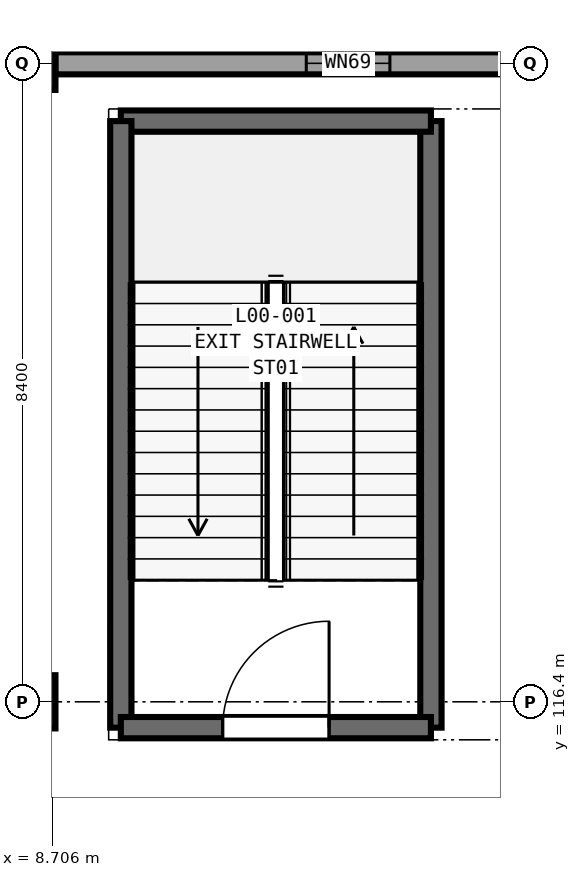
"""IFC4 building model, lengths in metres.
Left out: names, types, materials, properties, quantities, classifications, styles, units other than length and angle.
Written with IfcOpenShell. Run it as: python <this file> out.ifc"""

import sys

from ifc_helpers import new_model, si_unit, direction, frame, frame_2d, origin, origin_2d, place, context, subcontext, project, spatial, rectangle, extrude, element, fill, save


model = new_model("IFC4")
c1 = context("Model", 3, precision=1e-05, world=origin(), true_north=direction((0.0, 1.0)))
c2 = subcontext(c1, "Body", "Model", "MODEL_VIEW")
j1 = project(units=[si_unit("LENGTHUNIT", "METRE"), si_unit("PLANEANGLEUNIT", "RADIAN")], contexts=[c1])
p1 = place(None, origin())
s1 = spatial("IfcSite", under=j1, at=p1, CompositionType="ELEMENT")
p2 = place(p1, origin())
s2 = spatial("IfcBuilding", under=s1, at=p2, CompositionType="ELEMENT")
p3 = place(p2, origin())
s3 = spatial("IfcBuildingStorey", under=s2, at=p3, CompositionType="ELEMENT", Elevation=0.0)
for number, where, z_axis, x_axis in (
    (1, (8.4, 116.4, 0.0), (0.0, 0.0, 1.0), (1.0, 0.0, 0.0)),
    (2, (8.4, 124.8, 0.0), (0.0, 0.0, 1.0), (1.0, 0.0, 0.0)),
):
    element("IfcColumn", number, at=place(p3, frame(where, z_axis=z_axis, x_axis=x_axis)), inside=s3, PredefinedType="COLUMN", context=c2, shape_type="SweptSolid", body=[
        extrude(rectangle(XDim=0.7, YDim=0.7, at=origin_2d()), origin(), (0.0, 0.0, 1.0), 5.4),
    ])
p4 = place(p3, frame((8.748, 124.8, 0.0), z_axis=(0.0, 0.0, 1.0), x_axis=(1.0, 0.0, 0.0)))
e3 = element("IfcWall", 3, at=p4, inside=s3, PredefinedType="SOLIDWALL", context=c2, shape_type="SweptSolid", body=[
    extrude(rectangle(XDim=7.704, YDim=0.29, at=frame_2d((3.852, 0.0))), origin(), (0.0, 0.0, 1.0), 4.68),
])
p5 = place(p4, frame((3.302, 0.0, 0.9)))
e4 = element("IfcOpeningElement", 4, at=p5, cuts=e3, PredefinedType="OPENING", context=c2, shape_type="SweptSolid", body=[
    extrude(rectangle(XDim=1.1, YDim=1.55, at=frame_2d((0.55, 0.775))), frame((0.0, 0.155, 0.0), z_axis=(0.0, -1.0, 0.0), x_axis=(1.0, 0.0, 0.0)), (0.0, 0.0, 1.0), 0.31),
])
p6 = place(p3, frame((13.69, 116.06, 0.0), z_axis=(0.0, 0.0, 1.0), x_axis=(0.0, 1.0, 0.0)))
e5 = element("IfcWall", 5, at=p6, inside=s3, PredefinedType="SHEAR", context=c2, shape_type="SweptSolid", body=[
    extrude(rectangle(XDim=7.98, YDim=0.28, at=frame_2d((3.99, 0.0))), origin(), (0.0, 0.0, 1.0), 5.4),
])
p7 = place(p3, frame((13.69, 124.04, 0.0), z_axis=(0.0, 0.0, 1.0), x_axis=(-1.0, 0.0, 0.0)))
e6 = element("IfcWall", 6, at=p7, inside=s3, PredefinedType="SHEAR", context=c2, shape_type="SweptSolid", body=[
    extrude(rectangle(XDim=4.08, YDim=0.28, at=frame_2d((2.04, 0.0))), origin(), (0.0, 0.0, 1.0), 5.4),
])
p8 = place(p3, frame((9.61, 124.04, 0.0), z_axis=(0.0, 0.0, 1.0), x_axis=(0.0, -1.0, 0.0)))
e7 = element("IfcWall", 7, at=p8, inside=s3, PredefinedType="SHEAR", context=c2, shape_type="SweptSolid", body=[
    extrude(rectangle(XDim=7.98, YDim=0.28, at=frame_2d((3.99, 0.0))), origin(), (0.0, 0.0, 1.0), 5.4),
])
p9 = place(p3, frame((9.61, 116.06, 0.0), z_axis=(0.0, 0.0, 1.0), x_axis=(1.0, 0.0, 0.0)))
e8 = element("IfcWall", 8, at=p9, inside=s3, PredefinedType="SHEAR", context=c2, shape_type="SweptSolid", body=[
    extrude(rectangle(XDim=4.08, YDim=0.28, at=frame_2d((2.04, 0.0))), origin(), (0.0, 0.0, 1.0), 5.4),
])
p10 = place(p9, frame((1.34, 0.0, 0.0)))
e9 = element("IfcOpeningElement", 9, at=p10, cuts=e8, PredefinedType="OPENING", context=c2, shape_type="SweptSolid", body=[
    extrude(rectangle(XDim=1.4, YDim=2.2, at=frame_2d((0.7, 1.1))), frame((0.0, 0.15, 0.0), z_axis=(0.0, -1.0, 0.0), x_axis=(1.0, 0.0, 0.0)), (0.0, 0.0, 1.0), 0.3),
])
p11 = place(p5, origin())
e10 = element("IfcWindow", 10, at=p11, inside=s3, PartitioningType="SINGLE_PANEL", PredefinedType="WINDOW", context=c2, shape_type="SweptSolid", body=[
    extrude(rectangle(XDim=1.1, YDim=1.55, at=frame_2d((0.55, 0.775))), frame((0.0, 0.03, 0.0), z_axis=(0.0, -1.0, 0.0), x_axis=(1.0, 0.0, 0.0)), (0.0, 0.0, 1.0), 0.06),
])
fill(e4, e10)
p12 = place(p10, origin())
e11 = element("IfcDoor", 11, at=p12, inside=s3, OperationType="SINGLE_SWING_RIGHT", PredefinedType="DOOR", context=c2, shape_type="SweptSolid", body=[
    extrude(rectangle(XDim=1.4, YDim=2.2, at=frame_2d((0.7, 1.1))), frame((0.0, 0.025, 0.0), z_axis=(0.0, -1.0, 0.0), x_axis=(1.0, 0.0, 0.0)), (0.0, 0.0, 1.0), 0.05),
])
fill(e9, e11)
save(model, sys.argv[1])
